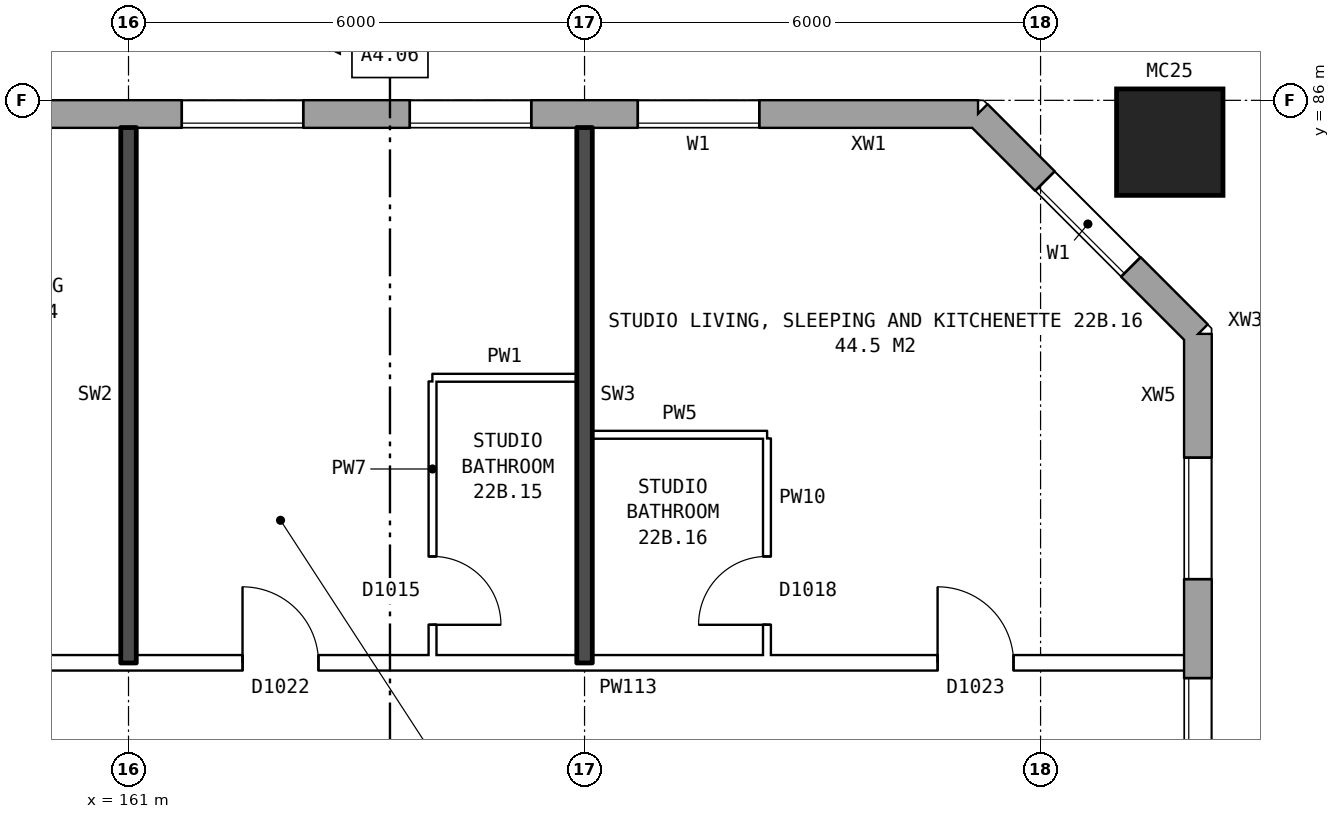
"""IFC4 building model, lengths in metres.
Left out: names, types, materials, properties, quantities, classifications, styles, units other than length and angle.
Written with IfcOpenShell. Run it as: python <this file> out.ifc"""

import sys

from ifc_helpers import new_model, si_unit, direction, frame, frame_2d, origin, origin_2d, place, context, subcontext, project, spatial, rectangle, hollow_rectangle, extrude, element, fill, save


model = new_model("IFC4")
c1 = context("Model", 3, precision=1e-05, world=origin(), true_north=direction((0.0, 1.0)))
c2 = subcontext(c1, "Body", "Model", "MODEL_VIEW")
j1 = project(units=[si_unit("LENGTHUNIT", "METRE"), si_unit("PLANEANGLEUNIT", "RADIAN")], contexts=[c1])
p1 = place(None, origin())
s1 = spatial("IfcSite", under=j1, at=p1, CompositionType="ELEMENT")
p2 = place(p1, origin())
s2 = spatial("IfcBuilding", under=s1, at=p2, CompositionType="ELEMENT")
p3 = place(p2, frame((0.0, 0.0, 80.9)))
s3 = spatial("IfcBuildingStorey", under=s2, at=p3, CompositionType="ELEMENT", Elevation=80.9)
p4 = place(p3, frame((174.7, 85.45, 0.0), z_axis=(0.0, 0.0, 1.0), x_axis=(1.0, 0.0, 0.0)))
e1 = element("IfcColumn", 1, at=p4, inside=s3, PredefinedType="COLUMN", context=c2, shape_type="SweptSolid", body=[
    extrude(hollow_rectangle(XDim=1.4, YDim=1.4, WallThickness=0.075, at=origin_2d()), origin(), (0.0, 0.0, 1.0), 3.1),
])
p5 = place(p3, frame((175.07, 57.075, 0.0), z_axis=(0.0, 0.0, 1.0), x_axis=(0.0, 1.0, 0.0)))
e2 = element("IfcWall", 2, at=p5, inside=s3, PredefinedType="STANDARD", context=c2, shape_type="SweptSolid", body=[
    extrude(rectangle(XDim=25.851, YDim=0.36, at=frame_2d((12.925, 0.0))), origin(), (0.0, 0.0, 1.0), 2.85),
])
p6 = place(p5, frame((1.625, 0.0, 0.8)))
e3 = element("IfcOpeningElement", 3, at=p6, cuts=e2, PredefinedType="OPENING", context=c2, shape_type="SweptSolid", body=[
    extrude(rectangle(XDim=1.6, YDim=1.8, at=frame_2d((0.8, 0.9))), frame((0.0, 0.19, 0.0), z_axis=(0.0, -1.0, 0.0), x_axis=(1.0, 0.0, 0.0)), (0.0, 0.0, 1.0), 0.38),
])
p7 = place(p5, frame((4.525, 0.0, 0.8)))
e4 = element("IfcOpeningElement", 4, at=p7, cuts=e2, PredefinedType="OPENING", context=c2, shape_type="SweptSolid", body=[
    extrude(rectangle(XDim=1.2, YDim=1.8, at=frame_2d((0.6, 0.9))), frame((0.0, 0.19, 0.0), z_axis=(0.0, -1.0, 0.0), x_axis=(1.0, 0.0, 0.0)), (0.0, 0.0, 1.0), 0.38),
])
p8 = place(p5, frame((6.025, 0.0, 0.8)))
e5 = element("IfcOpeningElement", 5, at=p8, cuts=e2, PredefinedType="OPENING", context=c2, shape_type="SweptSolid", body=[
    extrude(rectangle(XDim=1.0, YDim=0.9, at=frame_2d((0.5, 0.45))), frame((0.0, 0.19, 0.0), z_axis=(0.0, -1.0, 0.0), x_axis=(1.0, 0.0, 0.0)), (0.0, 0.0, 1.0), 0.38),
])
p9 = place(p5, frame((10.625, 0.0, 0.8)))
e6 = element("IfcOpeningElement", 6, at=p9, cuts=e2, PredefinedType="OPENING", context=c2, shape_type="SweptSolid", body=[
    extrude(rectangle(XDim=1.6, YDim=1.8, at=frame_2d((0.8, 0.9))), frame((0.0, 0.19, 0.0), z_axis=(0.0, -1.0, 0.0), x_axis=(1.0, 0.0, 0.0)), (0.0, 0.0, 1.0), 0.38),
])
p10 = place(p5, frame((13.625, 0.0, 0.8)))
e7 = element("IfcOpeningElement", 7, at=p10, cuts=e2, PredefinedType="OPENING", context=c2, shape_type="SweptSolid", body=[
    extrude(rectangle(XDim=1.6, YDim=1.8, at=frame_2d((0.8, 0.9))), frame((0.0, 0.19, 0.0), z_axis=(0.0, -1.0, 0.0), x_axis=(1.0, 0.0, 0.0)), (0.0, 0.0, 1.0), 0.38),
])
p11 = place(p5, frame((8.075, 0.0, 1.7)))
e8 = element("IfcOpeningElement", 8, at=p11, cuts=e2, PredefinedType="OPENING", context=c2, shape_type="SweptSolid", body=[
    extrude(rectangle(XDim=0.8, YDim=0.9, at=frame_2d((0.4, 0.45))), frame((0.0, 0.19, 0.0), z_axis=(0.0, -1.0, 0.0), x_axis=(1.0, 0.0, 0.0)), (0.0, 0.0, 1.0), 0.38),
])
p12 = place(p5, frame((9.325, 0.0, 0.8)))
e9 = element("IfcOpeningElement", 9, at=p12, cuts=e2, PredefinedType="OPENING", context=c2, shape_type="SweptSolid", body=[
    extrude(rectangle(XDim=1.0, YDim=1.8, at=frame_2d((0.5, 0.9))), frame((0.0, 0.19, 0.0), z_axis=(0.0, -1.0, 0.0), x_axis=(1.0, 0.0, 0.0)), (0.0, 0.0, 1.0), 0.38),
])
p13 = place(p5, frame((22.625, 0.0, 0.8)))
e10 = element("IfcOpeningElement", 10, at=p13, cuts=e2, PredefinedType="OPENING", context=c2, shape_type="SweptSolid", body=[
    extrude(rectangle(XDim=1.6, YDim=1.8, at=frame_2d((0.8, 0.9))), frame((0.0, 0.19, 0.0), z_axis=(0.0, -1.0, 0.0), x_axis=(1.0, 0.0, 0.0)), (0.0, 0.0, 1.0), 0.38),
])
p14 = place(p5, frame((12.525, 0.0, 0.8)))
e11 = element("IfcOpeningElement", 11, at=p14, cuts=e2, PredefinedType="OPENING", context=c2, shape_type="SweptSolid", body=[
    extrude(rectangle(XDim=0.8, YDim=1.8, at=frame_2d((0.4, 0.9))), frame((0.0, 0.19, 0.0), z_axis=(0.0, -1.0, 0.0), x_axis=(1.0, 0.0, 0.0)), (0.0, 0.0, 1.0), 0.38),
])
p15 = place(p5, frame((15.525, 0.0, 0.8)))
e12 = element("IfcOpeningElement", 12, at=p15, cuts=e2, PredefinedType="OPENING", context=c2, shape_type="SweptSolid", body=[
    extrude(rectangle(XDim=1.0, YDim=1.8, at=frame_2d((0.5, 0.9))), frame((0.0, 0.19, 0.0), z_axis=(0.0, -1.0, 0.0), x_axis=(1.0, 0.0, 0.0)), (0.0, 0.0, 1.0), 0.38),
])
p16 = place(p5, frame((16.825, 0.0, 1.6)))
e13 = element("IfcOpeningElement", 13, at=p16, cuts=e2, PredefinedType="OPENING", context=c2, shape_type="SweptSolid", body=[
    extrude(rectangle(XDim=0.8, YDim=0.9, at=frame_2d((0.4, 0.45))), frame((0.0, 0.19, 0.0), z_axis=(0.0, -1.0, 0.0), x_axis=(1.0, 0.0, 0.0)), (0.0, 0.0, 1.0), 0.38),
])
p17 = place(p5, frame((18.825, 0.0, 0.8)))
e14 = element("IfcOpeningElement", 14, at=p17, cuts=e2, PredefinedType="OPENING", context=c2, shape_type="SweptSolid", body=[
    extrude(rectangle(XDim=1.0, YDim=0.9, at=frame_2d((0.5, 0.45))), frame((0.0, 0.19, 0.0), z_axis=(0.0, -1.0, 0.0), x_axis=(1.0, 0.0, 0.0)), (0.0, 0.0, 1.0), 0.38),
])
p18 = place(p5, frame((20.125, 0.0, 0.8)))
e15 = element("IfcOpeningElement", 15, at=p18, cuts=e2, PredefinedType="OPENING", context=c2, shape_type="SweptSolid", body=[
    extrude(rectangle(XDim=1.2, YDim=1.8, at=frame_2d((0.6, 0.9))), frame((0.0, 0.19, 0.0), z_axis=(0.0, -1.0, 0.0), x_axis=(1.0, 0.0, 0.0)), (0.0, 0.0, 1.0), 0.38),
])
p19 = place(p3, frame((175.07, 82.925, 0.0), z_axis=(0.0, 0.0, 1.0), x_axis=(-0.707106781187, 0.707106781187, 0.0)))
e16 = element("IfcWall", 16, at=p19, inside=s3, PredefinedType="STANDARD", context=c2, shape_type="SweptSolid", body=[
    extrude(rectangle(XDim=4.094, YDim=0.36, at=frame_2d((2.047, 0.0))), origin(), (0.0, 0.0, 1.0), 2.85),
])
p20 = place(p19, frame((1.247, 0.0, 0.8)))
e17 = element("IfcOpeningElement", 17, at=p20, cuts=e16, PredefinedType="OPENING", context=c2, shape_type="SweptSolid", body=[
    extrude(rectangle(XDim=1.6, YDim=1.8, at=frame_2d((0.8, 0.9))), frame((0.0, 0.19, 0.0), z_axis=(0.0, -1.0, 0.0), x_axis=(1.0, 0.0, 0.0)), (0.0, 0.0, 1.0), 0.38),
])
p21 = place(p3, frame((172.175, 85.82, 0.0), z_axis=(0.0, 0.0, 1.0), x_axis=(-1.0, 0.0, 0.0)))
e18 = element("IfcWall", 18, at=p21, inside=s3, PredefinedType="STANDARD", context=c2, shape_type="SweptSolid", body=[
    extrude(rectangle(XDim=38.101, YDim=0.36, at=frame_2d((19.05, 0.0))), origin(), (0.0, 0.0, 1.0), 2.85),
])
p22 = place(p21, frame((2.875, 0.0, 0.8)))
e19 = element("IfcOpeningElement", 19, at=p22, cuts=e18, PredefinedType="OPENING", context=c2, shape_type="SweptSolid", body=[
    extrude(rectangle(XDim=1.6, YDim=1.8, at=frame_2d((0.8, 0.9))), frame((0.0, 0.19, 0.0), z_axis=(0.0, -1.0, 0.0), x_axis=(1.0, 0.0, 0.0)), (0.0, 0.0, 1.0), 0.38),
])
p23 = place(p21, frame((5.875, 0.0, 0.8)))
e20 = element("IfcOpeningElement", 20, at=p23, cuts=e18, PredefinedType="OPENING", context=c2, shape_type="SweptSolid", body=[
    extrude(rectangle(XDim=1.6, YDim=1.8, at=frame_2d((0.8, 0.9))), frame((0.0, 0.19, 0.0), z_axis=(0.0, -1.0, 0.0), x_axis=(1.0, 0.0, 0.0)), (0.0, 0.0, 1.0), 0.38),
])
p24 = place(p21, frame((8.875, 0.0, 0.8)))
e21 = element("IfcOpeningElement", 21, at=p24, cuts=e18, PredefinedType="OPENING", context=c2, shape_type="SweptSolid", body=[
    extrude(rectangle(XDim=1.6, YDim=1.8, at=frame_2d((0.8, 0.9))), frame((0.0, 0.19, 0.0), z_axis=(0.0, -1.0, 0.0), x_axis=(1.0, 0.0, 0.0)), (0.0, 0.0, 1.0), 0.38),
])
p25 = place(p21, frame((12.575, 0.0, 0.8)))
e22 = element("IfcOpeningElement", 22, at=p25, cuts=e18, PredefinedType="OPENING", context=c2, shape_type="SweptSolid", body=[
    extrude(rectangle(XDim=0.6, YDim=0.9, at=frame_2d((0.3, 0.45))), frame((0.0, 0.19, 0.0), z_axis=(0.0, -1.0, 0.0), x_axis=(1.0, 0.0, 0.0)), (0.0, 0.0, 1.0), 0.38),
])
p26 = place(p21, frame((14.875, 0.0, 0.8)))
e23 = element("IfcOpeningElement", 23, at=p26, cuts=e18, PredefinedType="OPENING", context=c2, shape_type="SweptSolid", body=[
    extrude(rectangle(XDim=1.6, YDim=1.8, at=frame_2d((0.8, 0.9))), frame((0.0, 0.19, 0.0), z_axis=(0.0, -1.0, 0.0), x_axis=(1.0, 0.0, 0.0)), (0.0, 0.0, 1.0), 0.38),
])
p27 = place(p21, frame((17.875, 0.0, 0.8)))
e24 = element("IfcOpeningElement", 24, at=p27, cuts=e18, PredefinedType="OPENING", context=c2, shape_type="SweptSolid", body=[
    extrude(rectangle(XDim=1.6, YDim=1.8, at=frame_2d((0.8, 0.9))), frame((0.0, 0.19, 0.0), z_axis=(0.0, -1.0, 0.0), x_axis=(1.0, 0.0, 0.0)), (0.0, 0.0, 1.0), 0.38),
])
p28 = place(p21, frame((20.875, 0.0, 0.8)))
e25 = element("IfcOpeningElement", 25, at=p28, cuts=e18, PredefinedType="OPENING", context=c2, shape_type="SweptSolid", body=[
    extrude(rectangle(XDim=1.6, YDim=1.8, at=frame_2d((0.8, 0.9))), frame((0.0, 0.19, 0.0), z_axis=(0.0, -1.0, 0.0), x_axis=(1.0, 0.0, 0.0)), (0.0, 0.0, 1.0), 0.38),
])
p29 = place(p21, frame((23.375, 0.0, 0.65)))
e26 = element("IfcOpeningElement", 26, at=p29, cuts=e18, PredefinedType="OPENING", context=c2, shape_type="SweptSolid", body=[
    extrude(rectangle(XDim=1.4, YDim=1.8, at=frame_2d((0.7, 0.9))), frame((0.0, 0.19, 0.0), z_axis=(0.0, -1.0, 0.0), x_axis=(1.0, 0.0, 0.0)), (0.0, 0.0, 1.0), 0.38),
])
p30 = place(p21, frame((26.675, 0.0, 1.7)))
e27 = element("IfcOpeningElement", 27, at=p30, cuts=e18, PredefinedType="OPENING", context=c2, shape_type="SweptSolid", body=[
    extrude(rectangle(XDim=0.6, YDim=0.9, at=frame_2d((0.3, 0.45))), frame((0.0, 0.19, 0.0), z_axis=(0.0, -1.0, 0.0), x_axis=(1.0, 0.0, 0.0)), (0.0, 0.0, 1.0), 0.38),
])
p31 = place(p21, frame((29.875, 0.0, 0.8)))
e28 = element("IfcOpeningElement", 28, at=p31, cuts=e18, PredefinedType="OPENING", context=c2, shape_type="SweptSolid", body=[
    extrude(rectangle(XDim=1.6, YDim=1.8, at=frame_2d((0.8, 0.9))), frame((0.0, 0.19, 0.0), z_axis=(0.0, -1.0, 0.0), x_axis=(1.0, 0.0, 0.0)), (0.0, 0.0, 1.0), 0.38),
])
p32 = place(p21, frame((32.875, 0.0, 0.8)))
e29 = element("IfcOpeningElement", 29, at=p32, cuts=e18, PredefinedType="OPENING", context=c2, shape_type="SweptSolid", body=[
    extrude(rectangle(XDim=1.6, YDim=1.8, at=frame_2d((0.8, 0.9))), frame((0.0, 0.19, 0.0), z_axis=(0.0, -1.0, 0.0), x_axis=(1.0, 0.0, 0.0)), (0.0, 0.0, 1.0), 0.38),
])
p33 = place(p21, frame((35.875, 0.0, 0.8)))
e30 = element("IfcOpeningElement", 30, at=p33, cuts=e18, PredefinedType="OPENING", context=c2, shape_type="SweptSolid", body=[
    extrude(rectangle(XDim=1.6, YDim=1.8, at=frame_2d((0.8, 0.9))), frame((0.0, 0.19, 0.0), z_axis=(0.0, -1.0, 0.0), x_axis=(1.0, 0.0, 0.0)), (0.0, 0.0, 1.0), 0.38),
])
p34 = place(p21, frame((13.475, 0.0, 0.8)))
e31 = element("IfcOpeningElement", 31, at=p34, cuts=e18, PredefinedType="OPENING", context=c2, shape_type="SweptSolid", body=[
    extrude(rectangle(XDim=1.0, YDim=1.8, at=frame_2d((0.5, 0.9))), frame((0.0, 0.19, 0.0), z_axis=(0.0, -1.0, 0.0), x_axis=(1.0, 0.0, 0.0)), (0.0, 0.0, 1.0), 0.38),
])
p35 = place(p21, frame((25.075, 0.0, 0.55)))
e32 = element("IfcOpeningElement", 32, at=p35, cuts=e18, PredefinedType="OPENING", context=c2, shape_type="SweptSolid", body=[
    extrude(rectangle(XDim=0.6, YDim=0.9, at=frame_2d((0.3, 0.45))), frame((0.0, 0.19, 0.0), z_axis=(0.0, -1.0, 0.0), x_axis=(1.0, 0.0, 0.0)), (0.0, 0.0, 1.0), 0.38),
])
p36 = place(p21, frame((27.575, 0.0, 0.8)))
e33 = element("IfcOpeningElement", 33, at=p36, cuts=e18, PredefinedType="OPENING", context=c2, shape_type="SweptSolid", body=[
    extrude(rectangle(XDim=1.4, YDim=1.8, at=frame_2d((0.7, 0.9))), frame((0.0, 0.19, 0.0), z_axis=(0.0, -1.0, 0.0), x_axis=(1.0, 0.0, 0.0)), (0.0, 0.0, 1.0), 0.38),
])
p37 = place(p3, frame((155.1, 78.6, 0.0), z_axis=(0.0, 0.0, 1.0), x_axis=(1.0, 0.0, 0.0)))
e34 = element("IfcWall", 34, at=p37, inside=s3, PredefinedType="PARTITIONING", context=c2, shape_type="SweptSolid", body=[
    extrude(rectangle(XDim=19.79, YDim=0.2, at=frame_2d((9.895, 0.0))), origin(), (0.0, 0.0, 1.0), 2.85),
])
p38 = place(p37, frame((3.6, 0.0, 0.0)))
e35 = element("IfcOpeningElement", 35, at=p38, cuts=e34, PredefinedType="OPENING", context=c2, shape_type="SweptSolid", body=[
    extrude(rectangle(XDim=1.0, YDim=2.1, at=frame_2d((0.5, 1.05))), frame((0.0, 0.11, 0.0), z_axis=(0.0, -1.0, 0.0), x_axis=(1.0, 0.0, 0.0)), (0.0, 0.0, 1.0), 0.22),
])
p39 = place(p37, frame((7.4, 0.0, 0.0)))
e36 = element("IfcOpeningElement", 36, at=p39, cuts=e34, PredefinedType="OPENING", context=c2, shape_type="SweptSolid", body=[
    extrude(rectangle(XDim=1.0, YDim=2.1, at=frame_2d((0.5, 1.05))), frame((0.0, 0.11, 0.0), z_axis=(0.0, -1.0, 0.0), x_axis=(1.0, 0.0, 0.0)), (0.0, 0.0, 1.0), 0.22),
])
p40 = place(p37, frame((16.545, 0.0, 0.0)))
e37 = element("IfcOpeningElement", 37, at=p40, cuts=e34, PredefinedType="OPENING", context=c2, shape_type="SweptSolid", body=[
    extrude(rectangle(XDim=1.0, YDim=2.1, at=frame_2d((0.5, 1.05))), frame((0.0, 0.11, 0.0), z_axis=(0.0, -1.0, 0.0), x_axis=(1.0, 0.0, 0.0)), (0.0, 0.0, 1.0), 0.22),
])
p41 = place(p3, frame((167.1, 81.6, 0.0), z_axis=(0.0, 0.0, 1.0), x_axis=(1.0, 0.0, 0.0)))
e38 = element("IfcWall", 38, at=p41, inside=s3, PredefinedType="PARTITIONING", context=c2, shape_type="SweptSolid", body=[
    extrude(rectangle(XDim=2.3, YDim=0.1, at=frame_2d((1.15, 0.0))), origin(), (0.0, 0.0, 1.0), 2.85),
])
p42 = place(p3, frame((165.0, 82.35, 0.0), z_axis=(0.0, 0.0, 1.0), x_axis=(1.0, 0.0, 0.0)))
e39 = element("IfcWall", 39, at=p42, inside=s3, PredefinedType="PARTITIONING", context=c2, shape_type="SweptSolid", body=[
    extrude(rectangle(XDim=1.9, YDim=0.1, at=frame_2d((0.95, 0.0))), origin(), (0.0, 0.0, 1.0), 2.85),
])
p43 = place(p3, frame((161.0, 78.6, 0.0), z_axis=(0.0, 0.0, 1.0), x_axis=(0.0, 1.0, 0.0)))
e40 = element("IfcWall", 40, at=p43, inside=s3, PredefinedType="SOLIDWALL", context=c2, shape_type="SweptSolid", body=[
    extrude(rectangle(XDim=7.04, YDim=0.2, at=frame_2d((3.52, 0.0))), origin(), (0.0, 0.0, 1.0), 2.85),
])
p44 = place(p3, frame((165.0, 78.7, 0.0), z_axis=(0.0, 0.0, 1.0), x_axis=(0.0, 1.0, 0.0)))
e41 = element("IfcWall", 41, at=p44, inside=s3, PredefinedType="PARTITIONING", context=c2, shape_type="SweptSolid", body=[
    extrude(rectangle(XDim=3.6, YDim=0.1, at=frame_2d((1.8, 0.0))), origin(), (0.0, 0.0, 1.0), 2.85),
])
p45 = place(p44, frame((0.4, 0.0, 0.0)))
e42 = element("IfcOpeningElement", 42, at=p45, cuts=e41, PredefinedType="OPENING", context=c2, shape_type="SweptSolid", body=[
    extrude(rectangle(XDim=0.9, YDim=2.1, at=frame_2d((0.45, 1.05))), frame((0.0, 0.06, 0.0), z_axis=(0.0, -1.0, 0.0), x_axis=(1.0, 0.0, 0.0)), (0.0, 0.0, 1.0), 0.12),
])
p46 = place(p3, frame((167.0, 78.6, 0.0), z_axis=(0.0, 0.0, 1.0), x_axis=(0.0, 1.0, 0.0)))
e43 = element("IfcWall", 43, at=p46, inside=s3, PredefinedType="SOLIDWALL", context=c2, shape_type="SweptSolid", body=[
    extrude(rectangle(XDim=7.04, YDim=0.2, at=frame_2d((3.52, 0.0))), origin(), (0.0, 0.0, 1.0), 2.85),
])
p47 = place(p3, frame((169.4, 78.7, 0.0), z_axis=(0.0, 0.0, 1.0), x_axis=(0.0, 1.0, 0.0)))
e44 = element("IfcWall", 44, at=p47, inside=s3, PredefinedType="PARTITIONING", context=c2, shape_type="SweptSolid", body=[
    extrude(rectangle(XDim=2.85, YDim=0.1, at=frame_2d((1.425, 0.0))), origin(), (0.0, 0.0, 1.0), 2.85),
])
p48 = place(p47, frame((0.4, 0.0, 0.0)))
e45 = element("IfcOpeningElement", 45, at=p48, cuts=e44, PredefinedType="OPENING", context=c2, shape_type="SweptSolid", body=[
    extrude(rectangle(XDim=0.9, YDim=2.1, at=frame_2d((0.45, 1.05))), frame((0.0, 0.06, 0.0), z_axis=(0.0, -1.0, 0.0), x_axis=(1.0, 0.0, 0.0)), (0.0, 0.0, 1.0), 0.12),
])
p49 = place(p13, origin())
e46 = element("IfcWindow", 46, at=p49, inside=s3, PartitioningType="SINGLE_PANEL", PredefinedType="WINDOW", context=c2, shape_type="SweptSolid", body=[
    extrude(rectangle(XDim=1.6, YDim=1.8, at=frame_2d((0.8, 0.9))), frame((0.0, 0.15, 0.0), z_axis=(0.0, -1.0, 0.0), x_axis=(1.0, 0.0, 0.0)), (0.0, 0.0, 1.0), 0.06),
])
fill(e10, e46)
p50 = place(p20, origin())
e47 = element("IfcWindow", 47, at=p50, inside=s3, PartitioningType="SINGLE_PANEL", PredefinedType="WINDOW", context=c2, shape_type="SweptSolid", body=[
    extrude(rectangle(XDim=1.6, YDim=1.8, at=frame_2d((0.8, 0.9))), frame((0.0, 0.15, 0.0), z_axis=(0.0, -1.0, 0.0), x_axis=(1.0, 0.0, 0.0)), (0.0, 0.0, 1.0), 0.06),
])
fill(e17, e47)
p51 = place(p22, origin())
e48 = element("IfcWindow", 48, at=p51, inside=s3, PartitioningType="SINGLE_PANEL", PredefinedType="WINDOW", context=c2, shape_type="SweptSolid", body=[
    extrude(rectangle(XDim=1.6, YDim=1.8, at=frame_2d((0.8, 0.9))), frame((0.0, 0.15, 0.0), z_axis=(0.0, -1.0, 0.0), x_axis=(1.0, 0.0, 0.0)), (0.0, 0.0, 1.0), 0.06),
])
fill(e19, e48)
p52 = place(p23, origin())
e49 = element("IfcWindow", 49, at=p52, inside=s3, PartitioningType="SINGLE_PANEL", PredefinedType="WINDOW", context=c2, shape_type="SweptSolid", body=[
    extrude(rectangle(XDim=1.6, YDim=1.8, at=frame_2d((0.8, 0.9))), frame((0.0, 0.15, 0.0), z_axis=(0.0, -1.0, 0.0), x_axis=(1.0, 0.0, 0.0)), (0.0, 0.0, 1.0), 0.06),
])
fill(e20, e49)
p53 = place(p24, origin())
e50 = element("IfcWindow", 50, at=p53, inside=s3, PartitioningType="SINGLE_PANEL", PredefinedType="WINDOW", context=c2, shape_type="SweptSolid", body=[
    extrude(rectangle(XDim=1.6, YDim=1.8, at=frame_2d((0.8, 0.9))), frame((0.0, 0.15, 0.0), z_axis=(0.0, -1.0, 0.0), x_axis=(1.0, 0.0, 0.0)), (0.0, 0.0, 1.0), 0.06),
])
fill(e21, e50)
p54 = place(p39, origin())
e51 = element("IfcDoor", 51, at=p54, inside=s3, OperationType="SINGLE_SWING_LEFT", PredefinedType="DOOR", context=c2, shape_type="SweptSolid", body=[
    extrude(rectangle(XDim=1.0, YDim=2.1, at=frame_2d((0.5, 1.05))), frame((0.0, 0.025, 0.0), z_axis=(0.0, -1.0, 0.0), x_axis=(1.0, 0.0, 0.0)), (0.0, 0.0, 1.0), 0.05),
])
fill(e36, e51)
p55 = place(p45, frame((0.9, 0.0, 0.0), z_axis=(0.0, 0.0, 1.0), x_axis=(-1.0, 0.0, 0.0)))
e52 = element("IfcDoor", 52, at=p55, inside=s3, OperationType="SINGLE_SWING_RIGHT", PredefinedType="DOOR", context=c2, shape_type="SweptSolid", body=[
    extrude(rectangle(XDim=0.9, YDim=2.1, at=frame_2d((0.45, 1.05))), frame((0.0, 0.025, 0.0), z_axis=(0.0, -1.0, 0.0), x_axis=(1.0, 0.0, 0.0)), (0.0, 0.0, 1.0), 0.05),
])
fill(e42, e52)
p56 = place(p40, origin())
e53 = element("IfcDoor", 53, at=p56, inside=s3, OperationType="SINGLE_SWING_LEFT", PredefinedType="DOOR", context=c2, shape_type="SweptSolid", body=[
    extrude(rectangle(XDim=1.0, YDim=2.1, at=frame_2d((0.5, 1.05))), frame((0.0, 0.025, 0.0), z_axis=(0.0, -1.0, 0.0), x_axis=(1.0, 0.0, 0.0)), (0.0, 0.0, 1.0), 0.05),
])
fill(e37, e53)
p57 = place(p48, origin())
e54 = element("IfcDoor", 54, at=p57, inside=s3, OperationType="SINGLE_SWING_LEFT", PredefinedType="DOOR", context=c2, shape_type="SweptSolid", body=[
    extrude(rectangle(XDim=0.9, YDim=2.1, at=frame_2d((0.45, 1.05))), frame((0.0, 0.025, 0.0), z_axis=(0.0, -1.0, 0.0), x_axis=(1.0, 0.0, 0.0)), (0.0, 0.0, 1.0), 0.05),
])
fill(e45, e54)
p58 = place(p18, origin())
e55 = element("IfcWindow", 55, at=p58, inside=s3, PartitioningType="SINGLE_PANEL", PredefinedType="WINDOW", context=c2, shape_type="SweptSolid", body=[
    extrude(rectangle(XDim=1.2, YDim=1.8, at=frame_2d((0.6, 0.9))), frame((0.0, 0.15, 0.0), z_axis=(0.0, -1.0, 0.0), x_axis=(1.0, 0.0, 0.0)), (0.0, 0.0, 1.0), 0.06),
])
fill(e15, e55)
save(model, sys.argv[1])
